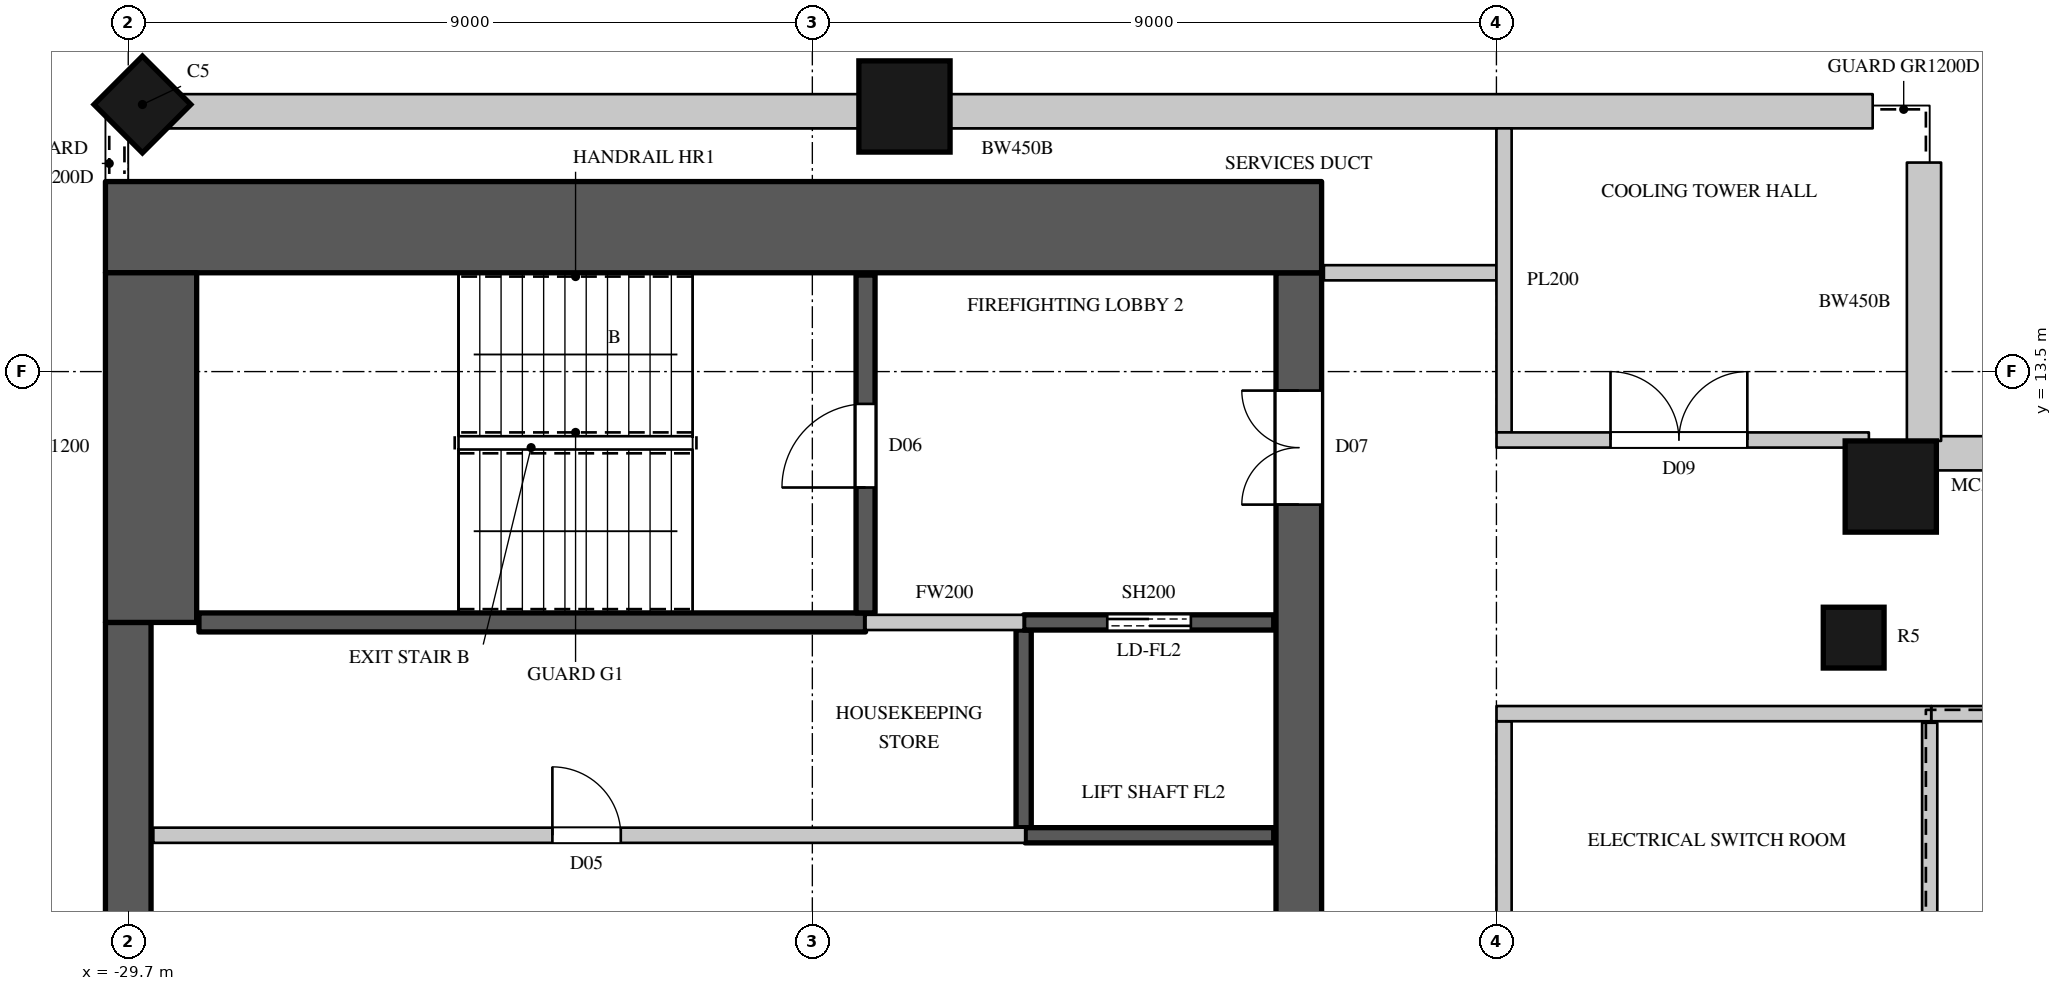
"""IFC4 building model, lengths in metres.
Left out: names, types, materials, properties, quantities, classifications, styles, units other than length and angle.
Written with IfcOpenShell. Run it as: python <this file> out.ifc"""

import sys

from ifc_helpers import new_model, si_unit, direction, frame, frame_2d, origin, origin_2d, place, context, subcontext, project, spatial, rectangle, circle, extrude, element, fill, save


model = new_model("IFC4")
c1 = context("Model", 3, precision=1e-05, world=origin(), true_north=direction((0.0, 1.0)))
c2 = subcontext(c1, "Body", "Model", "MODEL_VIEW")
j1 = project(units=[si_unit("LENGTHUNIT", "METRE"), si_unit("PLANEANGLEUNIT", "RADIAN")], contexts=[c1])
p1 = place(None, origin())
s1 = spatial("IfcSite", under=j1, at=p1, CompositionType="ELEMENT")
p2 = place(p1, origin())
s2 = spatial("IfcBuilding", under=s1, at=p2, CompositionType="ELEMENT")
p3 = place(p2, frame((0.0, 0.0, 339.0)))
s3 = spatial("IfcBuildingStorey", under=s2, at=p3, CompositionType="ELEMENT", Elevation=339.0)
for number, where, z_axis, x_axis in (
    (1, (-6.512, 11.988, 0.0), (0.0, 0.0, 1.0), (1.0, 0.0, 0.0)),
    (2, (-19.488, 16.988, 0.0), (0.0, 0.0, 1.0), (1.0, 0.0, 0.0)),
):
    element("IfcColumn", number, at=place(p3, frame(where, z_axis=z_axis, x_axis=x_axis)), inside=s3, PredefinedType="COLUMN", context=c2, shape_type="SweptSolid", body=[
        extrude(circle(Radius=0.6, at=origin_2d()), origin(), (0.0, 0.0, 1.0), 4.0),
    ])
p4 = place(p3, frame((-29.514, 17.014, 0.0), z_axis=(0.0, 0.0, 1.0), x_axis=(-0.707106781187, -0.707106781187, 0.0)))
e3 = element("IfcColumn", 3, at=p4, inside=s3, PredefinedType="COLUMN", context=c2, shape_type="SweptSolid", body=[
    extrude(rectangle(XDim=0.9, YDim=0.9, at=origin_2d()), origin(), (0.0, 0.0, 1.0), 4.0),
])
p5 = place(p3, frame((-7.0, 10.0, 0.0), z_axis=(0.0, 0.0, 1.0), x_axis=(1.0, 0.0, 0.0)))
e4 = element("IfcColumn", 4, at=p5, inside=s3, PredefinedType="COLUMN", context=c2, shape_type="SweptSolid", body=[
    extrude(circle(Radius=0.4, at=origin_2d()), origin(), (0.0, 0.0, 1.0), 4.0),
])
p6 = place(p3, frame((7.912, 12.425, 0.0), z_axis=(0.0, 0.0, 1.0), x_axis=(-1.0, 0.0, 0.0)))
e5 = element("IfcWall", 5, at=p6, inside=s3, PredefinedType="SOLIDWALL", context=c2, shape_type="SweptSolid", body=[
    extrude(rectangle(XDim=13.824, YDim=0.45, at=frame_2d((6.912, 0.0))), origin(), (0.0, 0.0, 1.0), 3.7),
])
p7 = place(p3, frame((-6.075, 12.588, 0.0), z_axis=(0.0, 0.0, 1.0), x_axis=(0.0, 1.0, 0.0)))
e6 = element("IfcWall", 6, at=p7, inside=s3, PredefinedType="SOLIDWALL", context=c2, shape_type="SweptSolid", body=[
    extrude(rectangle(XDim=3.662, YDim=0.45, at=frame_2d((1.831, 0.0))), origin(), (0.0, 0.0, 1.0), 3.7),
])
p8 = place(p3, frame((-6.75, 16.925, 0.0), z_axis=(0.0, 0.0, 1.0), x_axis=(-1.0, 0.0, 0.0)))
e7 = element("IfcWall", 7, at=p8, inside=s3, PredefinedType="SOLIDWALL", context=c2, shape_type="SweptSolid", body=[
    extrude(rectangle(XDim=22.5, YDim=0.45, at=frame_2d((11.25, 0.0))), origin(), (0.0, 0.0, 1.0), 1.85),
])
p9 = place(p3, frame((-30.0, 15.4, 0.0), z_axis=(0.0, 0.0, 1.0), x_axis=(1.0, 0.0, 0.0)))
e8 = element("IfcWall", 8, at=p9, inside=s3, PredefinedType="SHEAR", context=c2, shape_type="SweptSolid", body=[
    extrude(rectangle(XDim=16.0, YDim=1.2, at=frame_2d((8.0, 0.0))), origin(), (0.0, 0.0, 1.0), 4.0),
])
p10 = place(p3, frame((-14.3, -14.8, 0.0), z_axis=(0.0, 0.0, 1.0), x_axis=(0.0, 1.0, 0.0)))
e9 = element("IfcWall", 9, at=p10, inside=s3, PredefinedType="SHEAR", context=c2, shape_type="SweptSolid", body=[
    extrude(rectangle(XDim=29.6, YDim=0.6, at=frame_2d((14.8, 0.0))), origin(), (0.0, 0.0, 1.0), 4.0),
])
p11 = place(p10, frame((1.55, 0.0, 0.0)))
e10 = element("IfcOpeningElement", 10, at=p11, cuts=e9, PredefinedType="OPENING", context=c2, shape_type="SweptSolid", body=[
    extrude(rectangle(XDim=1.5, YDim=2.4, at=frame_2d((0.75, 1.2))), frame((0.0, 0.31, 0.0), z_axis=(0.0, -1.0, 0.0), x_axis=(1.0, 0.0, 0.0)), (0.0, 0.0, 1.0), 0.62),
])
p12 = place(p10, frame((26.55, 0.0, 0.0)))
e11 = element("IfcOpeningElement", 11, at=p12, cuts=e9, PredefinedType="OPENING", context=c2, shape_type="SweptSolid", body=[
    extrude(rectangle(XDim=1.5, YDim=2.4, at=frame_2d((0.75, 1.2))), frame((0.0, 0.31, 0.0), z_axis=(0.0, -1.0, 0.0), x_axis=(1.0, 0.0, 0.0)), (0.0, 0.0, 1.0), 0.62),
])
p13 = place(p10, frame((8.45, 0.0, 0.0)))
e12 = element("IfcOpeningElement", 12, at=p13, cuts=e9, PredefinedType="OPENING", context=c2, shape_type="SweptSolid", body=[
    extrude(rectangle(XDim=1.5, YDim=2.4, at=frame_2d((0.75, 1.2))), frame((0.0, 0.31, 0.0), z_axis=(0.0, -1.0, 0.0), x_axis=(1.0, 0.0, 0.0)), (0.0, 0.0, 1.0), 0.62),
])
p14 = place(p10, frame((19.65, 0.0, 0.0)))
e13 = element("IfcOpeningElement", 13, at=p14, cuts=e9, PredefinedType="OPENING", context=c2, shape_type="SweptSolid", body=[
    extrude(rectangle(XDim=1.5, YDim=2.4, at=frame_2d((0.75, 1.2))), frame((0.0, 0.31, 0.0), z_axis=(0.0, -1.0, 0.0), x_axis=(1.0, 0.0, 0.0)), (0.0, 0.0, 1.0), 0.62),
])
p15 = place(p10, frame((14.5, 0.0, 0.0)))
e14 = element("IfcOpeningElement", 14, at=p15, cuts=e9, PredefinedType="OPENING", context=c2, shape_type="SweptSolid", body=[
    extrude(rectangle(XDim=0.6, YDim=2.0, at=frame_2d((0.3, 1.0))), frame((0.0, 0.31, 0.0), z_axis=(0.0, -1.0, 0.0), x_axis=(1.0, 0.0, 0.0)), (0.0, 0.0, 1.0), 0.62),
])
p16 = place(p3, frame((-29.7, -10.2, 0.0), z_axis=(0.0, 0.0, 1.0), x_axis=(0.0, 1.0, 0.0)))
e15 = element("IfcWall", 15, at=p16, inside=s3, PredefinedType="SHEAR", context=c2, shape_type="SweptSolid", body=[
    extrude(rectangle(XDim=20.4, YDim=0.6, at=frame_2d((10.2, 0.0))), origin(), (0.0, 0.0, 1.0), 4.0),
])
p17 = place(p3, frame((-29.4, 10.2, 0.0), z_axis=(0.0, 0.0, 1.0), x_axis=(0.0, 1.0, 0.0)))
e16 = element("IfcWall", 16, at=p17, inside=s3, PredefinedType="SHEAR", context=c2, shape_type="SweptSolid", body=[
    extrude(rectangle(XDim=4.6, YDim=1.2, at=frame_2d((2.3, 0.0))), origin(), (0.0, 0.0, 1.0), 4.0),
])
p18 = place(p3, frame((-29.37, 7.4, 0.0), z_axis=(0.0, 0.0, 1.0), x_axis=(1.0, 0.0, 0.0)))
e17 = element("IfcWall", 17, at=p18, inside=s3, PredefinedType="PARTITIONING", context=c2, shape_type="SweptSolid", body=[
    extrude(rectangle(XDim=11.47, YDim=0.2, at=frame_2d((5.735, 0.0))), origin(), (0.0, 0.0, 1.0), 3.598),
])
p19 = place(p18, frame((5.25, 0.0, 0.0)))
e18 = element("IfcOpeningElement", 18, at=p19, cuts=e17, PredefinedType="OPENING", context=c2, shape_type="SweptSolid", body=[
    extrude(rectangle(XDim=0.9, YDim=2.2, at=frame_2d((0.45, 1.1))), frame((0.0, 0.11, 0.0), z_axis=(0.0, -1.0, 0.0), x_axis=(1.0, 0.0, 0.0)), (0.0, 0.0, 1.0), 0.22),
])
p20 = place(p3, frame((-20.0, 10.2, 0.0), z_axis=(0.0, 0.0, 1.0), x_axis=(1.0, 0.0, 0.0)))
e19 = element("IfcWall", 19, at=p20, inside=s3, PredefinedType="PARTITIONING", context=c2, shape_type="SweptSolid", body=[
    extrude(rectangle(XDim=2.08, YDim=0.2, at=frame_2d((1.04, 0.0))), origin(), (0.0, 0.0, 1.0), 3.598),
])
p21 = place(p3, frame((-5.98, 9.0, 0.0), z_axis=(0.0, 0.0, 1.0), x_axis=(1.0, 0.0, 0.0)))
e20 = element("IfcWall", 20, at=p21, inside=s3, PredefinedType="PARTITIONING", context=c2, shape_type="SweptSolid", body=[
    extrude(rectangle(XDim=13.96, YDim=0.2, at=frame_2d((6.98, 0.0))), origin(), (0.0, 0.0, 1.0), 3.598),
])
p22 = place(p3, frame((-13.97, 14.8, 0.0), z_axis=(0.0, 0.0, 1.0), x_axis=(1.0, 0.0, 0.0)))
e21 = element("IfcWall", 21, at=p22, inside=s3, PredefinedType="PARTITIONING", context=c2, shape_type="SweptSolid", body=[
    extrude(rectangle(XDim=2.27, YDim=0.2, at=frame_2d((1.135, 0.0))), origin(), (0.0, 0.0, 1.0), 3.598),
])
p23 = place(p3, frame((-11.6, -8.899, 0.0), z_axis=(0.0, 0.0, 1.0), x_axis=(0.0, 1.0, 0.0)))
e22 = element("IfcWall", 22, at=p23, inside=s3, PredefinedType="PARTITIONING", context=c2, shape_type="SweptSolid", body=[
    extrude(rectangle(XDim=17.798, YDim=0.2, at=frame_2d((8.899, 0.0))), origin(), (0.0, 0.0, 1.0), 3.05),
])
p24 = place(p23, frame((4.1, 0.0, 0.0)))
e23 = element("IfcOpeningElement", 23, at=p24, cuts=e22, PredefinedType="OPENING", context=c2, shape_type="SweptSolid", body=[
    extrude(rectangle(XDim=1.8, YDim=2.4, at=frame_2d((0.9, 1.2))), frame((0.0, 0.11, 0.0), z_axis=(0.0, -1.0, 0.0), x_axis=(1.0, 0.0, 0.0)), (0.0, 0.0, 1.0), 0.22),
])
p25 = place(p23, frame((12.85, 0.0, 0.0)))
e24 = element("IfcOpeningElement", 24, at=p25, cuts=e22, PredefinedType="OPENING", context=c2, shape_type="SweptSolid", body=[
    extrude(rectangle(XDim=1.8, YDim=2.4, at=frame_2d((0.9, 1.2))), frame((0.0, 0.11, 0.0), z_axis=(0.0, -1.0, 0.0), x_axis=(1.0, 0.0, 0.0)), (0.0, 0.0, 1.0), 0.22),
])
p26 = place(p3, frame((-11.6, 12.701, 0.0), z_axis=(0.0, 0.0, 1.0), x_axis=(0.0, 1.0, 0.0)))
e25 = element("IfcWall", 25, at=p26, inside=s3, PredefinedType="PARTITIONING", context=c2, shape_type="SweptSolid", body=[
    extrude(rectangle(XDim=3.999, YDim=0.2, at=frame_2d((2.0, 0.0))), origin(), (0.0, 0.0, 1.0), 3.598),
])
p27 = place(p3, frame((-11.699, 9.0, 0.0), z_axis=(0.0, 0.0, 1.0), x_axis=(1.0, 0.0, 0.0)))
e26 = element("IfcWall", 26, at=p27, inside=s3, PredefinedType="PARTITIONING", context=c2, shape_type="SweptSolid", body=[
    extrude(rectangle(XDim=5.719, YDim=0.2, at=frame_2d((2.859, 0.0))), origin(), (0.0, 0.0, 1.0), 3.598),
])
p28 = place(p3, frame((-11.699, 12.6, 0.0), z_axis=(0.0, 0.0, 1.0), x_axis=(1.0, 0.0, 0.0)))
e27 = element("IfcWall", 27, at=p28, inside=s3, PredefinedType="PARTITIONING", context=c2, shape_type="SweptSolid", body=[
    extrude(rectangle(XDim=4.899, YDim=0.2, at=frame_2d((2.449, 0.0))), origin(), (0.0, 0.0, 1.0), 3.598),
])
p29 = place(p28, frame((1.5, 0.0, 0.0)))
e28 = element("IfcOpeningElement", 28, at=p29, cuts=e27, PredefinedType="OPENING", context=c2, shape_type="SweptSolid", body=[
    extrude(rectangle(XDim=1.8, YDim=2.4, at=frame_2d((0.9, 1.2))), frame((0.0, 0.11, 0.0), z_axis=(0.0, -1.0, 0.0), x_axis=(1.0, 0.0, 0.0)), (0.0, 0.0, 1.0), 0.22),
])
p30 = place(p3, frame((-6.0, 1.02, 0.0), z_axis=(0.0, 0.0, 1.0), x_axis=(0.0, 1.0, 0.0)))
e29 = element("IfcWall", 29, at=p30, inside=s3, PredefinedType="PARTITIONING", context=c2, shape_type="SweptSolid", body=[
    extrude(rectangle(XDim=7.86, YDim=0.2, at=frame_2d((3.93, 0.0))), origin(), (0.0, 0.0, 1.0), 3.598),
])
p31 = place(p3, frame((-17.92, 7.5, 0.0), z_axis=(0.0, 0.0, 1.0), x_axis=(0.0, 1.0, 0.0)))
e30 = element("IfcWall", 30, at=p31, inside=s3, PredefinedType="SHEAR", context=c2, shape_type="SweptSolid", body=[
    extrude(rectangle(XDim=2.6, YDim=0.2, at=frame_2d((1.3, 0.0))), origin(), (0.0, 0.0, 1.0), 3.598),
])
p32 = place(p3, frame((-17.9, 7.4, 0.0), z_axis=(0.0, 0.0, 1.0), x_axis=(1.0, 0.0, 0.0)))
e31 = element("IfcWall", 31, at=p32, inside=s3, PredefinedType="SHEAR", context=c2, shape_type="SweptSolid", body=[
    extrude(rectangle(XDim=3.27, YDim=0.2, at=frame_2d((1.635, 0.0))), origin(), (0.0, 0.0, 1.0), 3.598),
])
p33 = place(p3, frame((-17.92, 10.2, 0.0), z_axis=(0.0, 0.0, 1.0), x_axis=(1.0, 0.0, 0.0)))
e32 = element("IfcWall", 32, at=p33, inside=s3, PredefinedType="SHEAR", context=c2, shape_type="SweptSolid", body=[
    extrude(rectangle(XDim=3.29, YDim=0.2, at=frame_2d((1.645, 0.0))), origin(), (0.0, 0.0, 1.0), 3.598),
])
p34 = place(p33, frame((1.1, 0.0, 0.0)))
e33 = element("IfcOpeningElement", 33, at=p34, cuts=e32, PredefinedType="OPENING", context=c2, shape_type="SweptSolid", body=[
    extrude(rectangle(XDim=1.1, YDim=2.2, at=frame_2d((0.55, 1.1))), frame((0.0, 0.11, 0.0), z_axis=(0.0, -1.0, 0.0), x_axis=(1.0, 0.0, 0.0)), (0.0, 0.0, 1.0), 0.22),
])
p35 = place(p3, frame((-28.77, 10.2, 0.0), z_axis=(0.0, 0.0, 1.0), x_axis=(1.0, 0.0, 0.0)))
e34 = element("IfcWall", 34, at=p35, inside=s3, PredefinedType="SHEAR", context=c2, shape_type="SweptSolid", body=[
    extrude(rectangle(XDim=8.77, YDim=0.25, at=frame_2d((4.385, 0.0))), origin(), (0.0, 0.0, 1.0), 3.598),
])
p36 = place(p3, frame((-20.0, 10.325, 0.0), z_axis=(0.0, 0.0, 1.0), x_axis=(0.0, 1.0, 0.0)))
e35 = element("IfcWall", 35, at=p36, inside=s3, PredefinedType="SHEAR", context=c2, shape_type="SweptSolid", body=[
    extrude(rectangle(XDim=4.445, YDim=0.25, at=frame_2d((2.223, 0.0))), origin(), (0.0, 0.0, 1.0), 3.598),
])
p37 = place(p36, frame((1.65, 0.0, 0.0)))
e36 = element("IfcOpeningElement", 36, at=p37, cuts=e35, PredefinedType="OPENING", context=c2, shape_type="SweptSolid", body=[
    extrude(rectangle(XDim=1.1, YDim=2.2, at=frame_2d((0.55, 1.1))), frame((0.0, 0.135, 0.0), z_axis=(0.0, -1.0, 0.0), x_axis=(1.0, 0.0, 0.0)), (0.0, 0.0, 1.0), 0.27),
])
p38 = place(p37, origin())
e37 = element("IfcDoor", 37, at=p38, inside=s3, OperationType="SINGLE_SWING_LEFT", PredefinedType="DOOR", context=c2, shape_type="SweptSolid", body=[
    extrude(rectangle(XDim=1.1, YDim=2.2, at=frame_2d((0.55, 1.1))), frame((0.0, 0.025, 0.0), z_axis=(0.0, -1.0, 0.0), x_axis=(1.0, 0.0, 0.0)), (0.0, 0.0, 1.0), 0.05),
])
fill(e36, e37)
p39 = place(p19, origin())
e38 = element("IfcDoor", 38, at=p39, inside=s3, OperationType="SINGLE_SWING_LEFT", PredefinedType="DOOR", context=c2, shape_type="SweptSolid", body=[
    extrude(rectangle(XDim=0.9, YDim=2.2, at=frame_2d((0.45, 1.1))), frame((0.0, 0.025, 0.0), z_axis=(0.0, -1.0, 0.0), x_axis=(1.0, 0.0, 0.0)), (0.0, 0.0, 1.0), 0.05),
])
fill(e18, e38)
p40 = place(p34, origin())
e39 = element("IfcDoor", 39, at=p40, inside=s3, OperationType="DOUBLE_DOOR_SLIDING", PredefinedType="DOOR", context=c2, shape_type="SweptSolid", body=[
    extrude(rectangle(XDim=1.1, YDim=2.2, at=frame_2d((0.55, 1.1))), frame((0.0, 0.025, 0.0), z_axis=(0.0, -1.0, 0.0), x_axis=(1.0, 0.0, 0.0)), (0.0, 0.0, 1.0), 0.05),
])
fill(e33, e39)
p41 = place(p29, origin())
e40 = element("IfcDoor", 40, at=p41, inside=s3, OperationType="DOUBLE_DOOR_SINGLE_SWING", PredefinedType="DOOR", context=c2, shape_type="SweptSolid", body=[
    extrude(rectangle(XDim=1.8, YDim=2.4, at=frame_2d((0.9, 1.2))), frame((0.0, 0.025, 0.0), z_axis=(0.0, -1.0, 0.0), x_axis=(1.0, 0.0, 0.0)), (0.0, 0.0, 1.0), 0.05),
])
fill(e28, e40)
p42 = place(p12, origin())
e41 = element("IfcDoor", 41, at=p42, inside=s3, OperationType="DOUBLE_DOOR_SINGLE_SWING", PredefinedType="DOOR", context=c2, shape_type="SweptSolid", body=[
    extrude(rectangle(XDim=1.5, YDim=2.4, at=frame_2d((0.75, 1.2))), frame((0.0, 0.295, 0.0), z_axis=(0.0, -1.0, 0.0), x_axis=(1.0, 0.0, 0.0)), (0.0, 0.0, 1.0), 0.05),
])
fill(e11, e41)
save(model, sys.argv[1])
